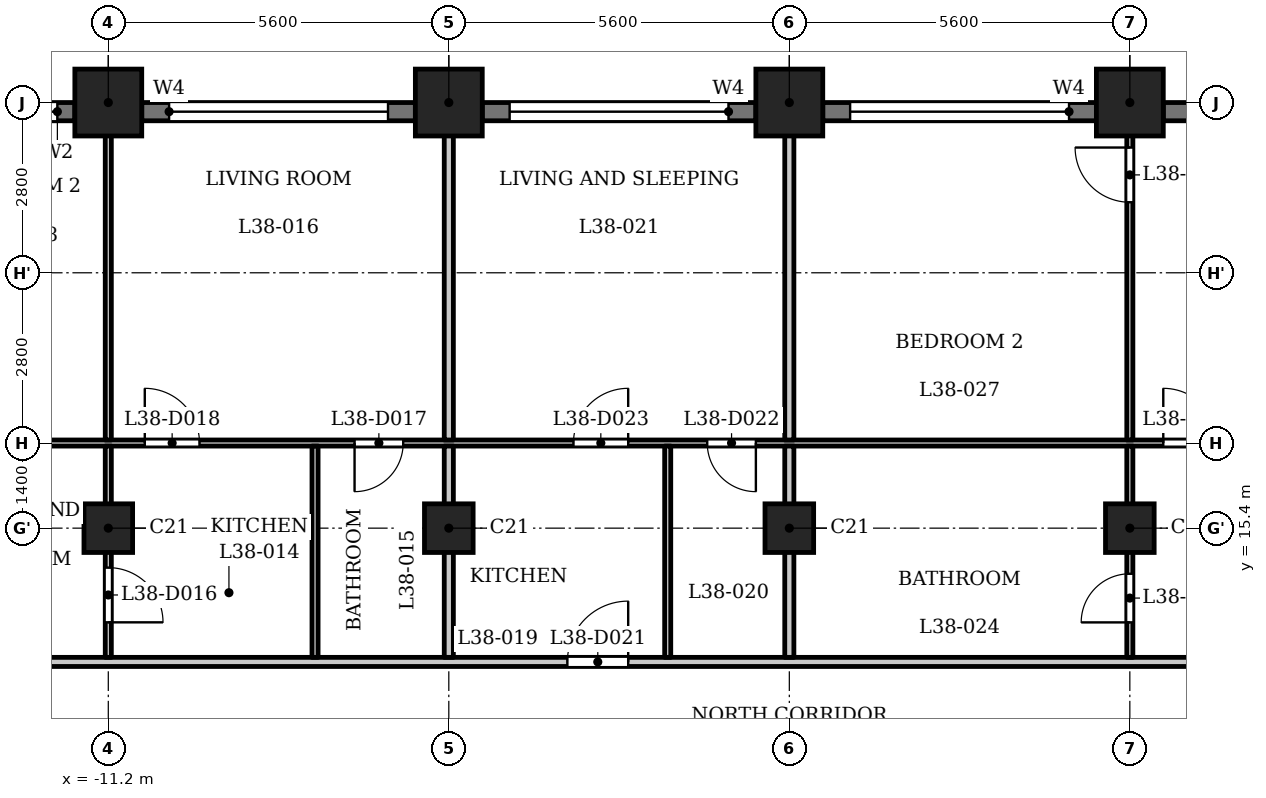
"""IFC4 building model, lengths in metres.
Left out: names, types, materials, properties, quantities, classifications, styles, units other than length and angle.
Written with IfcOpenShell. Run it as: python <this file> out.ifc"""

import sys

from ifc_helpers import new_model, si_unit, direction, frame, frame_2d, origin, origin_2d, place, context, subcontext, project, spatial, rectangle, extrude, element, fill, save


model = new_model("IFC4")
c1 = context("Model", 3, precision=1e-05, world=origin(), true_north=direction((0.0, 1.0)))
c2 = subcontext(c1, "Body", "Model", "MODEL_VIEW")
j1 = project(units=[si_unit("LENGTHUNIT", "METRE"), si_unit("PLANEANGLEUNIT", "RADIAN")], contexts=[c1])
p1 = place(None, origin())
s1 = spatial("IfcSite", under=j1, at=p1, CompositionType="ELEMENT")
p2 = place(p1, origin())
s2 = spatial("IfcBuilding", under=s1, at=p2, CompositionType="ELEMENT")
p3 = place(p2, frame((0.0, 0.0, 150.1)))
s3 = spatial("IfcBuildingStorey", under=s2, at=p3, CompositionType="ELEMENT", Elevation=150.1)
for number, where, z_axis, x_axis in (
    (1, (5.6, 22.4, 0.0), (0.0, 0.0, 1.0), (1.0, 0.0, 0.0)),
    (2, (0.0, 22.4, 0.0), (0.0, 0.0, 1.0), (1.0, 0.0, 0.0)),
    (3, (-5.6, 22.4, 0.0), (0.0, 0.0, 1.0), (1.0, 0.0, 0.0)),
    (4, (-11.2, 22.4, 0.0), (0.0, 0.0, 1.0), (1.0, 0.0, 0.0)),
):
    element("IfcColumn", number, at=place(p3, frame(where, z_axis=z_axis, x_axis=x_axis)), inside=s3, PredefinedType="COLUMN", context=c2, shape_type="SweptSolid", body=[
        extrude(rectangle(XDim=1.1, YDim=1.1, at=origin_2d()), origin(), (0.0, 0.0, 1.0), 3.5),
    ])
for number, where, z_axis, x_axis in (
    (5, (-11.2, 15.4, 0.0), (0.0, 0.0, 1.0), (1.0, 0.0, 0.0)),
    (6, (-5.6, 15.4, 0.0), (0.0, 0.0, 1.0), (1.0, 0.0, 0.0)),
    (7, (0.0, 15.4, 0.0), (0.0, 0.0, 1.0), (1.0, 0.0, 0.0)),
    (8, (5.6, 15.4, 0.0), (0.0, 0.0, 1.0), (1.0, 0.0, 0.0)),
):
    element("IfcColumn", number, at=place(p3, frame(where, z_axis=z_axis, x_axis=x_axis)), inside=s3, PredefinedType="COLUMN", context=c2, shape_type="SweptSolid", body=[
        extrude(rectangle(XDim=0.8, YDim=0.8, at=origin_2d()), origin(), (0.0, 0.0, 1.0), 3.5),
    ])
p4 = place(p3, frame((10.65, 22.25, 0.0), z_axis=(0.0, 0.0, 1.0), x_axis=(-1.0, 0.0, 0.0)))
e9 = element("IfcWall", 9, at=p4, inside=s3, PredefinedType="SOLIDWALL", context=c2, shape_type="SweptSolid", body=[
    extrude(rectangle(XDim=4.5, YDim=0.3, at=frame_2d((2.25, 0.0))), origin(), (0.0, 0.0, 1.0), 2.45),
])
p5 = place(p4, frame((0.45, 0.0, 1.2)))
e10 = element("IfcOpeningElement", 10, at=p5, cuts=e9, PredefinedType="OPENING", context=c2, shape_type="SweptSolid", body=[
    extrude(rectangle(XDim=3.6, YDim=0.95, at=frame_2d((1.8, 0.475))), frame((0.0, 0.16, 0.0), z_axis=(0.0, -1.0, 0.0), x_axis=(1.0, 0.0, 0.0)), (0.0, 0.0, 1.0), 0.32),
])
p6 = place(p3, frame((5.05, 22.25, 0.0), z_axis=(0.0, 0.0, 1.0), x_axis=(-1.0, 0.0, 0.0)))
e11 = element("IfcWall", 11, at=p6, inside=s3, PredefinedType="SOLIDWALL", context=c2, shape_type="SweptSolid", body=[
    extrude(rectangle(XDim=4.5, YDim=0.3, at=frame_2d((2.25, 0.0))), origin(), (0.0, 0.0, 1.0), 2.45),
])
p7 = place(p6, frame((0.45, 0.0, 1.2)))
e12 = element("IfcOpeningElement", 12, at=p7, cuts=e11, PredefinedType="OPENING", context=c2, shape_type="SweptSolid", body=[
    extrude(rectangle(XDim=3.6, YDim=0.95, at=frame_2d((1.8, 0.475))), frame((0.0, 0.16, 0.0), z_axis=(0.0, -1.0, 0.0), x_axis=(1.0, 0.0, 0.0)), (0.0, 0.0, 1.0), 0.32),
])
p8 = place(p3, frame((-0.55, 22.25, 0.0), z_axis=(0.0, 0.0, 1.0), x_axis=(-1.0, 0.0, 0.0)))
e13 = element("IfcWall", 13, at=p8, inside=s3, PredefinedType="SOLIDWALL", context=c2, shape_type="SweptSolid", body=[
    extrude(rectangle(XDim=4.5, YDim=0.3, at=frame_2d((2.25, 0.0))), origin(), (0.0, 0.0, 1.0), 2.45),
])
p9 = place(p8, frame((0.45, 0.0, 1.2)))
e14 = element("IfcOpeningElement", 14, at=p9, cuts=e13, PredefinedType="OPENING", context=c2, shape_type="SweptSolid", body=[
    extrude(rectangle(XDim=3.6, YDim=0.95, at=frame_2d((1.8, 0.475))), frame((0.0, 0.16, 0.0), z_axis=(0.0, -1.0, 0.0), x_axis=(1.0, 0.0, 0.0)), (0.0, 0.0, 1.0), 0.32),
])
p10 = place(p3, frame((-6.15, 22.25, 0.0), z_axis=(0.0, 0.0, 1.0), x_axis=(-1.0, 0.0, 0.0)))
e15 = element("IfcWall", 15, at=p10, inside=s3, PredefinedType="SOLIDWALL", context=c2, shape_type="SweptSolid", body=[
    extrude(rectangle(XDim=4.5, YDim=0.3, at=frame_2d((2.25, 0.0))), origin(), (0.0, 0.0, 1.0), 2.45),
])
p11 = place(p10, frame((0.45, 0.0, 1.2)))
e16 = element("IfcOpeningElement", 16, at=p11, cuts=e15, PredefinedType="OPENING", context=c2, shape_type="SweptSolid", body=[
    extrude(rectangle(XDim=3.6, YDim=0.95, at=frame_2d((1.8, 0.475))), frame((0.0, 0.16, 0.0), z_axis=(0.0, -1.0, 0.0), x_axis=(1.0, 0.0, 0.0)), (0.0, 0.0, 1.0), 0.32),
])
p12 = place(p3, frame((-11.75, 22.25, 0.0), z_axis=(0.0, 0.0, 1.0), x_axis=(-1.0, 0.0, 0.0)))
e17 = element("IfcWall", 17, at=p12, inside=s3, PredefinedType="SOLIDWALL", context=c2, shape_type="SweptSolid", body=[
    extrude(rectangle(XDim=4.5, YDim=0.3, at=frame_2d((2.25, 0.0))), origin(), (0.0, 0.0, 1.0), 2.45),
])
p13 = place(p12, frame((0.288, 0.0, 0.9)))
e18 = element("IfcOpeningElement", 18, at=p13, cuts=e17, PredefinedType="OPENING", context=c2, shape_type="SweptSolid", body=[
    extrude(rectangle(XDim=1.8, YDim=1.25, at=frame_2d((0.9, 0.625))), frame((0.0, 0.16, 0.0), z_axis=(0.0, -1.0, 0.0), x_axis=(1.0, 0.0, 0.0)), (0.0, 0.0, 1.0), 0.32),
])
p14 = place(p12, frame((2.913, 0.0, 0.6)))
e19 = element("IfcOpeningElement", 19, at=p14, cuts=e17, PredefinedType="OPENING", context=c2, shape_type="SweptSolid", body=[
    extrude(rectangle(XDim=1.2, YDim=1.55, at=frame_2d((0.6, 0.775))), frame((0.0, 0.16, 0.0), z_axis=(0.0, -1.0, 0.0), x_axis=(1.0, 0.0, 0.0)), (0.0, 0.0, 1.0), 0.32),
])
p15 = place(p3, frame((-17.4, 13.2, 0.0), z_axis=(0.0, 0.0, 1.0), x_axis=(1.0, 0.0, 0.0)))
e20 = element("IfcWall", 20, at=p15, inside=s3, PredefinedType="PARTITIONING", context=c2, shape_type="SweptSolid", body=[
    extrude(rectangle(XDim=34.8, YDim=0.15, at=frame_2d((17.4, 0.0))), origin(), (0.0, 0.0, 1.0), 3.2),
])
p16 = place(p15, frame((0.25, 0.0, 0.0)))
e21 = element("IfcOpeningElement", 21, at=p16, cuts=e20, PredefinedType="OPENING", context=c2, shape_type="SweptSolid", body=[
    extrude(rectangle(XDim=1.0, YDim=2.1, at=frame_2d((0.5, 1.05))), frame((0.0, 0.085, 0.0), z_axis=(0.0, -1.0, 0.0), x_axis=(1.0, 0.0, 0.0)), (0.0, 0.0, 1.0), 0.17),
])
p17 = place(p15, frame((33.65, 0.0, 0.0)))
e22 = element("IfcOpeningElement", 22, at=p17, cuts=e20, PredefinedType="OPENING", context=c2, shape_type="SweptSolid", body=[
    extrude(rectangle(XDim=1.0, YDim=2.1, at=frame_2d((0.5, 1.05))), frame((0.0, 0.085, 0.0), z_axis=(0.0, -1.0, 0.0), x_axis=(1.0, 0.0, 0.0)), (0.0, 0.0, 1.0), 0.17),
])
p18 = place(p15, frame((13.75, 0.0, 0.0)))
e23 = element("IfcOpeningElement", 23, at=p18, cuts=e20, PredefinedType="OPENING", context=c2, shape_type="SweptSolid", body=[
    extrude(rectangle(XDim=1.0, YDim=2.1, at=frame_2d((0.5, 1.05))), frame((0.0, 0.085, 0.0), z_axis=(0.0, -1.0, 0.0), x_axis=(1.0, 0.0, 0.0)), (0.0, 0.0, 1.0), 0.17),
])
p19 = place(p3, frame((-16.725, 16.8, 0.0), z_axis=(0.0, 0.0, 1.0), x_axis=(1.0, 0.0, 0.0)))
e24 = element("IfcWall", 24, at=p19, inside=s3, PredefinedType="PARTITIONING", context=c2, shape_type="SweptSolid", body=[
    extrude(rectangle(XDim=33.45, YDim=0.1, at=frame_2d((16.725, 0.0))), origin(), (0.0, 0.0, 1.0), 3.2),
])
p20 = place(p19, frame((9.575, 0.0, 0.0)))
e25 = element("IfcOpeningElement", 25, at=p20, cuts=e24, PredefinedType="OPENING", context=c2, shape_type="SweptSolid", body=[
    extrude(rectangle(XDim=0.8, YDim=2.1, at=frame_2d((0.4, 1.05))), frame((0.0, 0.06, 0.0), z_axis=(0.0, -1.0, 0.0), x_axis=(1.0, 0.0, 0.0)), (0.0, 0.0, 1.0), 0.12),
])
p21 = place(p19, frame((6.125, 0.0, 0.0)))
e26 = element("IfcOpeningElement", 26, at=p21, cuts=e24, PredefinedType="OPENING", context=c2, shape_type="SweptSolid", body=[
    extrude(rectangle(XDim=0.9, YDim=2.1, at=frame_2d((0.45, 1.05))), frame((0.0, 0.06, 0.0), z_axis=(0.0, -1.0, 0.0), x_axis=(1.0, 0.0, 0.0)), (0.0, 0.0, 1.0), 0.12),
])
p22 = place(p19, frame((0.975, 0.0, 0.0)))
e27 = element("IfcOpeningElement", 27, at=p22, cuts=e24, PredefinedType="OPENING", context=c2, shape_type="SweptSolid", body=[
    extrude(rectangle(XDim=0.9, YDim=2.1, at=frame_2d((0.45, 1.05))), frame((0.0, 0.06, 0.0), z_axis=(0.0, -1.0, 0.0), x_axis=(1.0, 0.0, 0.0)), (0.0, 0.0, 1.0), 0.12),
])
p23 = place(p19, frame((3.225, 0.0, 0.0)))
e28 = element("IfcOpeningElement", 28, at=p23, cuts=e24, PredefinedType="OPENING", context=c2, shape_type="SweptSolid", body=[
    extrude(rectangle(XDim=0.9, YDim=2.1, at=frame_2d((0.45, 1.05))), frame((0.0, 0.06, 0.0), z_axis=(0.0, -1.0, 0.0), x_axis=(1.0, 0.0, 0.0)), (0.0, 0.0, 1.0), 0.12),
])
p24 = place(p19, frame((15.375, 0.0, 0.0)))
e29 = element("IfcOpeningElement", 29, at=p24, cuts=e24, PredefinedType="OPENING", context=c2, shape_type="SweptSolid", body=[
    extrude(rectangle(XDim=0.8, YDim=2.1, at=frame_2d((0.4, 1.05))), frame((0.0, 0.06, 0.0), z_axis=(0.0, -1.0, 0.0), x_axis=(1.0, 0.0, 0.0)), (0.0, 0.0, 1.0), 0.12),
])
p25 = place(p19, frame((13.175, 0.0, 0.0)))
e30 = element("IfcOpeningElement", 30, at=p25, cuts=e24, PredefinedType="OPENING", context=c2, shape_type="SweptSolid", body=[
    extrude(rectangle(XDim=0.9, YDim=2.1, at=frame_2d((0.45, 1.05))), frame((0.0, 0.06, 0.0), z_axis=(0.0, -1.0, 0.0), x_axis=(1.0, 0.0, 0.0)), (0.0, 0.0, 1.0), 0.12),
])
p26 = place(p19, frame((31.975, 0.0, 0.0)))
e31 = element("IfcOpeningElement", 31, at=p26, cuts=e24, PredefinedType="OPENING", context=c2, shape_type="SweptSolid", body=[
    extrude(rectangle(XDim=0.9, YDim=2.1, at=frame_2d((0.45, 1.05))), frame((0.0, 0.06, 0.0), z_axis=(0.0, -1.0, 0.0), x_axis=(1.0, 0.0, 0.0)), (0.0, 0.0, 1.0), 0.12),
])
p27 = place(p19, frame((22.875, 0.0, 0.0)))
e32 = element("IfcOpeningElement", 32, at=p27, cuts=e24, PredefinedType="OPENING", context=c2, shape_type="SweptSolid", body=[
    extrude(rectangle(XDim=0.9, YDim=2.1, at=frame_2d((0.45, 1.05))), frame((0.0, 0.06, 0.0), z_axis=(0.0, -1.0, 0.0), x_axis=(1.0, 0.0, 0.0)), (0.0, 0.0, 1.0), 0.12),
])
p28 = place(p3, frame((-11.2, 13.275, 0.0), z_axis=(0.0, 0.0, 1.0), x_axis=(0.0, 1.0, 0.0)))
e33 = element("IfcWall", 33, at=p28, inside=s3, PredefinedType="PARTITIONING", context=c2, shape_type="SweptSolid", body=[
    extrude(rectangle(XDim=3.475, YDim=0.1, at=frame_2d((1.738, 0.0))), origin(), (0.0, 0.0, 1.0), 3.2),
])
p29 = place(p28, frame((0.576, 0.0, 0.0)))
e34 = element("IfcOpeningElement", 34, at=p29, cuts=e33, PredefinedType="OPENING", context=c2, shape_type="SweptSolid", body=[
    extrude(rectangle(XDim=0.9, YDim=2.1, at=frame_2d((0.45, 1.05))), frame((0.0, 0.06, 0.0), z_axis=(0.0, -1.0, 0.0), x_axis=(1.0, 0.0, 0.0)), (0.0, 0.0, 1.0), 0.12),
])
p30 = place(p3, frame((-11.2, 16.85, 0.0), z_axis=(0.0, 0.0, 1.0), x_axis=(0.0, 1.0, 0.0)))
e35 = element("IfcWall", 35, at=p30, inside=s3, PredefinedType="PARTITIONING", context=c2, shape_type="SweptSolid", body=[
    extrude(rectangle(XDim=6.08, YDim=0.1, at=frame_2d((3.04, 0.0))), origin(), (0.0, 0.0, 1.0), 3.2),
])
p31 = place(p3, frame((-7.8, 13.275, 0.0), z_axis=(0.0, 0.0, 1.0), x_axis=(0.0, 1.0, 0.0)))
e36 = element("IfcWall", 36, at=p31, inside=s3, PredefinedType="PARTITIONING", context=c2, shape_type="SweptSolid", body=[
    extrude(rectangle(XDim=3.475, YDim=0.1, at=frame_2d((1.738, 0.0))), origin(), (0.0, 0.0, 1.0), 3.2),
])
p32 = place(p3, frame((-5.6, 13.275, 0.0), z_axis=(0.0, 0.0, 1.0), x_axis=(0.0, 1.0, 0.0)))
e37 = element("IfcWall", 37, at=p32, inside=s3, PredefinedType="PARTITIONING", context=c2, shape_type="SweptSolid", body=[
    extrude(rectangle(XDim=3.475, YDim=0.15, at=frame_2d((1.738, 0.0))), origin(), (0.0, 0.0, 1.0), 3.2),
])
p33 = place(p3, frame((-5.6, 16.85, 0.0), z_axis=(0.0, 0.0, 1.0), x_axis=(0.0, 1.0, 0.0)))
e38 = element("IfcWall", 38, at=p33, inside=s3, PredefinedType="PARTITIONING", context=c2, shape_type="SweptSolid", body=[
    extrude(rectangle(XDim=6.08, YDim=0.15, at=frame_2d((3.04, 0.0))), origin(), (0.0, 0.0, 1.0), 3.2),
])
p34 = place(p3, frame((-2.0, 13.275, 0.0), z_axis=(0.0, 0.0, 1.0), x_axis=(0.0, 1.0, 0.0)))
e39 = element("IfcWall", 39, at=p34, inside=s3, PredefinedType="PARTITIONING", context=c2, shape_type="SweptSolid", body=[
    extrude(rectangle(XDim=3.475, YDim=0.1, at=frame_2d((1.738, 0.0))), origin(), (0.0, 0.0, 1.0), 3.2),
])
p35 = place(p3, frame((0.0, 13.275, 0.0), z_axis=(0.0, 0.0, 1.0), x_axis=(0.0, 1.0, 0.0)))
e40 = element("IfcWall", 40, at=p35, inside=s3, PredefinedType="PARTITIONING", context=c2, shape_type="SweptSolid", body=[
    extrude(rectangle(XDim=3.475, YDim=0.15, at=frame_2d((1.738, 0.0))), origin(), (0.0, 0.0, 1.0), 3.2),
])
p36 = place(p3, frame((0.0, 16.85, 0.0), z_axis=(0.0, 0.0, 1.0), x_axis=(0.0, 1.0, 0.0)))
e41 = element("IfcWall", 41, at=p36, inside=s3, PredefinedType="PARTITIONING", context=c2, shape_type="SweptSolid", body=[
    extrude(rectangle(XDim=6.08, YDim=0.15, at=frame_2d((3.04, 0.0))), origin(), (0.0, 0.0, 1.0), 3.2),
])
p37 = place(p3, frame((5.6, 13.275, 0.0), z_axis=(0.0, 0.0, 1.0), x_axis=(0.0, 1.0, 0.0)))
e42 = element("IfcWall", 42, at=p37, inside=s3, PredefinedType="PARTITIONING", context=c2, shape_type="SweptSolid", body=[
    extrude(rectangle(XDim=3.475, YDim=0.1, at=frame_2d((1.738, 0.0))), origin(), (0.0, 0.0, 1.0), 3.2),
])
p38 = place(p37, frame((0.575, 0.0, 0.0)))
e43 = element("IfcOpeningElement", 43, at=p38, cuts=e42, PredefinedType="OPENING", context=c2, shape_type="SweptSolid", body=[
    extrude(rectangle(XDim=0.8, YDim=2.1, at=frame_2d((0.4, 1.05))), frame((0.0, 0.06, 0.0), z_axis=(0.0, -1.0, 0.0), x_axis=(1.0, 0.0, 0.0)), (0.0, 0.0, 1.0), 0.12),
])
p39 = place(p3, frame((5.6, 16.85, 0.0), z_axis=(0.0, 0.0, 1.0), x_axis=(0.0, 1.0, 0.0)))
e44 = element("IfcWall", 44, at=p39, inside=s3, PredefinedType="PARTITIONING", context=c2, shape_type="SweptSolid", body=[
    extrude(rectangle(XDim=6.08, YDim=0.1, at=frame_2d((3.04, 0.0))), origin(), (0.0, 0.0, 1.0), 3.2),
])
p40 = place(p39, frame((3.91, 0.0, 0.0)))
e45 = element("IfcOpeningElement", 45, at=p40, cuts=e44, PredefinedType="OPENING", context=c2, shape_type="SweptSolid", body=[
    extrude(rectangle(XDim=0.9, YDim=2.1, at=frame_2d((0.45, 1.05))), frame((0.0, 0.06, 0.0), z_axis=(0.0, -1.0, 0.0), x_axis=(1.0, 0.0, 0.0)), (0.0, 0.0, 1.0), 0.12),
])
p41 = place(p29, origin())
e46 = element("IfcDoor", 46, at=p41, inside=s3, OperationType="SINGLE_SWING_LEFT", PredefinedType="DOOR", context=c2, shape_type="SweptSolid", body=[
    extrude(rectangle(XDim=0.9, YDim=2.1, at=frame_2d((0.45, 1.05))), frame((0.0, 0.025, 0.0), z_axis=(0.0, -1.0, 0.0), x_axis=(1.0, 0.0, 0.0)), (0.0, 0.0, 1.0), 0.05),
])
fill(e34, e46)
p42 = place(p20, origin())
e47 = element("IfcDoor", 47, at=p42, inside=s3, OperationType="SINGLE_SWING_LEFT", PredefinedType="DOOR", context=c2, shape_type="SweptSolid", body=[
    extrude(rectangle(XDim=0.8, YDim=2.1, at=frame_2d((0.4, 1.05))), frame((0.0, 0.025, 0.0), z_axis=(0.0, -1.0, 0.0), x_axis=(1.0, 0.0, 0.0)), (0.0, 0.0, 1.0), 0.05),
])
fill(e25, e47)
p43 = place(p21, origin())
e48 = element("IfcDoor", 48, at=p43, inside=s3, OperationType="SINGLE_SWING_RIGHT", PredefinedType="DOOR", context=c2, shape_type="SweptSolid", body=[
    extrude(rectangle(XDim=0.9, YDim=2.1, at=frame_2d((0.45, 1.05))), frame((0.0, 0.025, 0.0), z_axis=(0.0, -1.0, 0.0), x_axis=(1.0, 0.0, 0.0)), (0.0, 0.0, 1.0), 0.05),
])
fill(e26, e48)
p44 = place(p18, origin())
e49 = element("IfcDoor", 49, at=p44, inside=s3, OperationType="SINGLE_SWING_LEFT", PredefinedType="DOOR", context=c2, shape_type="SweptSolid", body=[
    extrude(rectangle(XDim=1.0, YDim=2.1, at=frame_2d((0.5, 1.05))), frame((0.0, 0.025, 0.0), z_axis=(0.0, -1.0, 0.0), x_axis=(1.0, 0.0, 0.0)), (0.0, 0.0, 1.0), 0.05),
])
fill(e23, e49)
p45 = place(p24, origin())
e50 = element("IfcDoor", 50, at=p45, inside=s3, OperationType="SINGLE_SWING_RIGHT", PredefinedType="DOOR", context=c2, shape_type="SweptSolid", body=[
    extrude(rectangle(XDim=0.8, YDim=2.1, at=frame_2d((0.4, 1.05))), frame((0.0, 0.025, 0.0), z_axis=(0.0, -1.0, 0.0), x_axis=(1.0, 0.0, 0.0)), (0.0, 0.0, 1.0), 0.05),
])
fill(e29, e50)
p46 = place(p25, origin())
e51 = element("IfcDoor", 51, at=p46, inside=s3, OperationType="SINGLE_SWING_LEFT", PredefinedType="DOOR", context=c2, shape_type="SweptSolid", body=[
    extrude(rectangle(XDim=0.9, YDim=2.1, at=frame_2d((0.45, 1.05))), frame((0.0, 0.025, 0.0), z_axis=(0.0, -1.0, 0.0), x_axis=(1.0, 0.0, 0.0)), (0.0, 0.0, 1.0), 0.05),
])
fill(e30, e51)
p47 = place(p38, origin())
e52 = element("IfcDoor", 52, at=p47, inside=s3, OperationType="SINGLE_SWING_RIGHT", PredefinedType="DOOR", context=c2, shape_type="SweptSolid", body=[
    extrude(rectangle(XDim=0.8, YDim=2.1, at=frame_2d((0.4, 1.05))), frame((0.0, 0.025, 0.0), z_axis=(0.0, -1.0, 0.0), x_axis=(1.0, 0.0, 0.0)), (0.0, 0.0, 1.0), 0.05),
])
fill(e43, e52)
p48 = place(p27, origin())
e53 = element("IfcDoor", 53, at=p48, inside=s3, OperationType="SINGLE_SWING_RIGHT", PredefinedType="DOOR", context=c2, shape_type="SweptSolid", body=[
    extrude(rectangle(XDim=0.9, YDim=2.1, at=frame_2d((0.45, 1.05))), frame((0.0, 0.025, 0.0), z_axis=(0.0, -1.0, 0.0), x_axis=(1.0, 0.0, 0.0)), (0.0, 0.0, 1.0), 0.05),
])
fill(e32, e53)
p49 = place(p40, origin())
e54 = element("IfcDoor", 54, at=p49, inside=s3, OperationType="SINGLE_SWING_LEFT", PredefinedType="DOOR", context=c2, shape_type="SweptSolid", body=[
    extrude(rectangle(XDim=0.9, YDim=2.1, at=frame_2d((0.45, 1.05))), frame((0.0, 0.025, 0.0), z_axis=(0.0, -1.0, 0.0), x_axis=(1.0, 0.0, 0.0)), (0.0, 0.0, 1.0), 0.05),
])
fill(e45, e54)
p50 = place(p7, origin())
e55 = element("IfcWindow", 55, at=p50, inside=s3, PartitioningType="SINGLE_PANEL", PredefinedType="WINDOW", context=c2, shape_type="SweptSolid", body=[
    extrude(rectangle(XDim=3.6, YDim=0.95, at=frame_2d((1.8, 0.475))), frame((0.0, 0.03, 0.0), z_axis=(0.0, -1.0, 0.0), x_axis=(1.0, 0.0, 0.0)), (0.0, 0.0, 1.0), 0.06),
])
fill(e12, e55)
p51 = place(p9, origin())
e56 = element("IfcWindow", 56, at=p51, inside=s3, PartitioningType="SINGLE_PANEL", PredefinedType="WINDOW", context=c2, shape_type="SweptSolid", body=[
    extrude(rectangle(XDim=3.6, YDim=0.95, at=frame_2d((1.8, 0.475))), frame((0.0, 0.03, 0.0), z_axis=(0.0, -1.0, 0.0), x_axis=(1.0, 0.0, 0.0)), (0.0, 0.0, 1.0), 0.06),
])
fill(e14, e56)
p52 = place(p11, origin())
e57 = element("IfcWindow", 57, at=p52, inside=s3, PartitioningType="SINGLE_PANEL", PredefinedType="WINDOW", context=c2, shape_type="SweptSolid", body=[
    extrude(rectangle(XDim=3.6, YDim=0.95, at=frame_2d((1.8, 0.475))), frame((0.0, 0.03, 0.0), z_axis=(0.0, -1.0, 0.0), x_axis=(1.0, 0.0, 0.0)), (0.0, 0.0, 1.0), 0.06),
])
fill(e16, e57)
p53 = place(p13, origin())
e58 = element("IfcWindow", 58, at=p53, inside=s3, PartitioningType="SINGLE_PANEL", PredefinedType="WINDOW", context=c2, shape_type="SweptSolid", body=[
    extrude(rectangle(XDim=1.8, YDim=1.25, at=frame_2d((0.9, 0.625))), frame((0.0, 0.03, 0.0), z_axis=(0.0, -1.0, 0.0), x_axis=(1.0, 0.0, 0.0)), (0.0, 0.0, 1.0), 0.06),
])
fill(e18, e58)
save(model, sys.argv[1])
